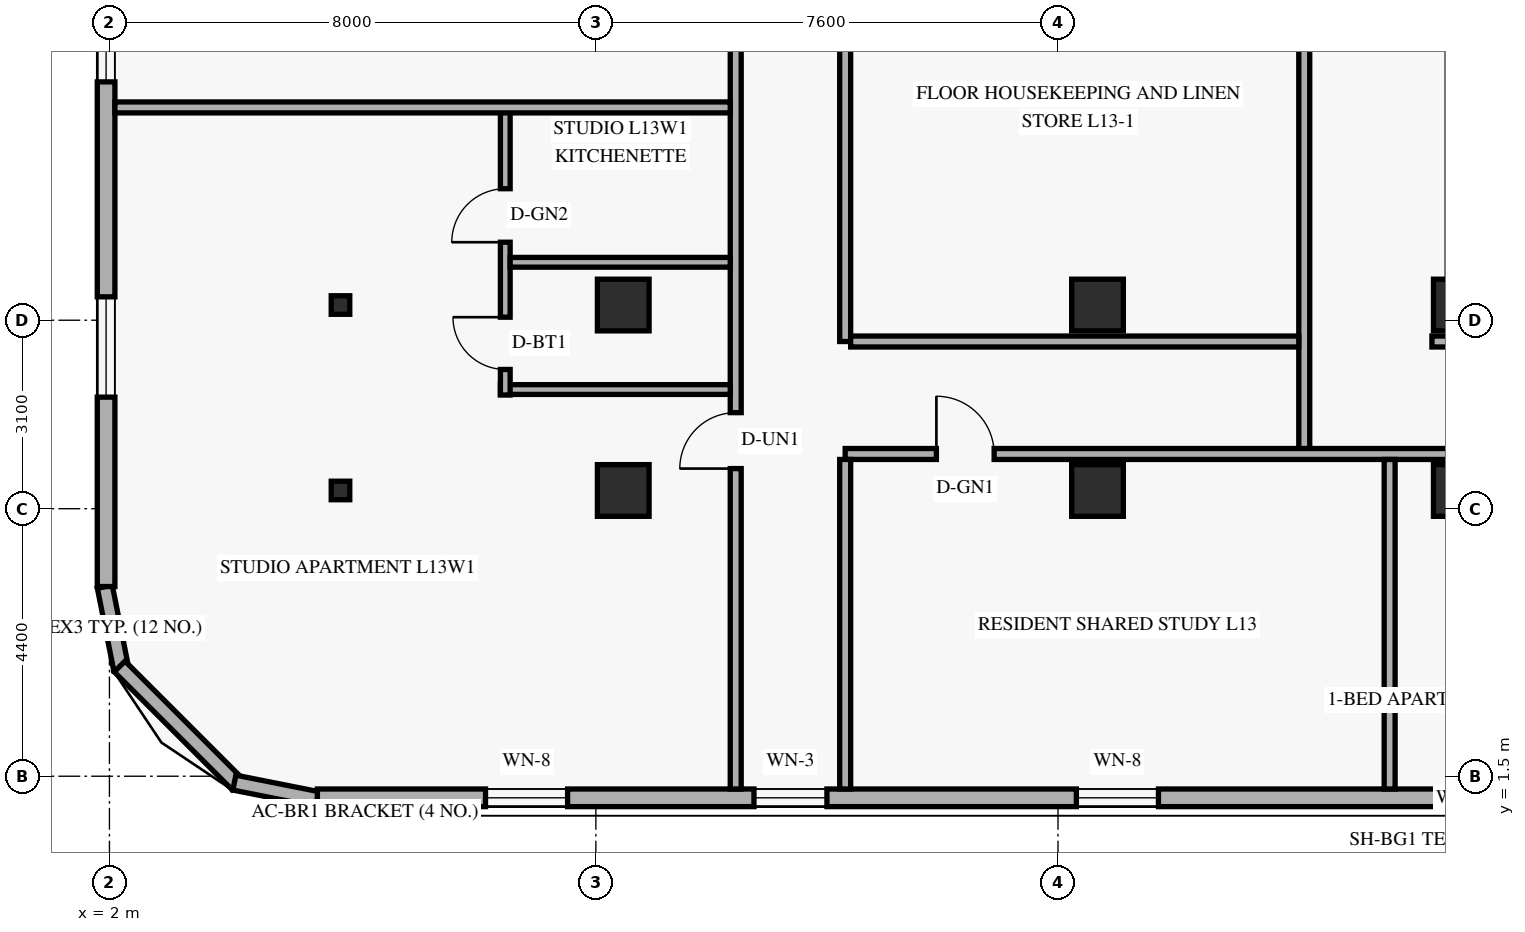
"""IFC4 building model, lengths in metres.
Left out: names, types, materials, properties, quantities, classifications, styles, units other than length and angle.
Written with IfcOpenShell. Run it as: python <this file> out.ifc"""

import sys

from ifc_helpers import new_model, si_unit, direction, frame, frame_2d, origin, origin_2d, place, context, subcontext, project, spatial, rectangle, hollow_rectangle, extrude, element, fill, save


model = new_model("IFC4")
c1 = context("Model", 3, precision=1e-05, world=origin(), true_north=direction((0.0, 1.0)))
c2 = subcontext(c1, "Body", "Model", "MODEL_VIEW")
j1 = project(units=[si_unit("LENGTHUNIT", "METRE"), si_unit("PLANEANGLEUNIT", "RADIAN")], contexts=[c1])
p1 = place(None, origin())
s1 = spatial("IfcSite", under=j1, at=p1, CompositionType="ELEMENT")
p2 = place(p1, origin())
s2 = spatial("IfcBuilding", under=s1, at=p2, CompositionType="ELEMENT")
p3 = place(p2, frame((0.0, 0.0, 52.8)))
s3 = spatial("IfcBuildingStorey", under=s2, at=p3, CompositionType="ELEMENT", Elevation=52.8)
for number, where, z_axis, x_axis in (
    (1, (5.8, 6.2, 0.0), (0.0, 0.0, 1.0), (1.0, 0.0, 0.0)),
    (2, (5.8, 9.25, 0.0), (0.0, 0.0, 1.0), (1.0, 0.0, 0.0)),
):
    element("IfcColumn", number, at=place(p3, frame(where, z_axis=z_axis, x_axis=x_axis)), inside=s3, PredefinedType="COLUMN", context=c2, shape_type="SweptSolid", body=[
        extrude(hollow_rectangle(XDim=0.305, YDim=0.305, WallThickness=0.013, at=origin_2d()), origin(), (0.0, 0.0, 1.0), 3.6),
    ])
for number, where, z_axis, x_axis in (
    (3, (10.45, 6.2, 0.0), (0.0, 0.0, 1.0), (1.0, 0.0, 0.0)),
    (4, (10.45, 9.25, 0.0), (0.0, 0.0, 1.0), (1.0, 0.0, 0.0)),
    (5, (18.25, 6.2, 0.0), (0.0, 0.0, 1.0), (1.0, 0.0, 0.0)),
    (6, (18.25, 9.25, 0.0), (0.0, 0.0, 1.0), (1.0, 0.0, 0.0)),
    (7, (24.2, 6.2, 0.0), (0.0, 0.0, 1.0), (1.0, 0.0, 0.0)),
    (8, (24.2, 9.25, 0.0), (0.0, 0.0, 1.0), (1.0, 0.0, 0.0)),
):
    element("IfcColumn", number, at=place(p3, frame(where, z_axis=z_axis, x_axis=x_axis)), inside=s3, PredefinedType="COLUMN", context=c2, shape_type="SweptSolid", body=[
        extrude(rectangle(XDim=0.85, YDim=0.85, at=origin_2d()), origin(), (0.0, 0.0, 1.0), 3.6),
    ])
p4 = place(p3, frame((1.924, 4.616, 0.0), z_axis=(0.0, 0.0, 1.0), x_axis=(0.19496651342, -0.980809899341, 0.0)))
e9 = element("IfcWall", 9, at=p4, inside=s3, PredefinedType="SOLIDWALL", context=c2, shape_type="SweptSolid", body=[
    extrude(rectangle(XDim=1.389, YDim=0.25, at=frame_2d((0.694, 0.0))), origin(), (0.0, 0.0, 1.0), 3.36),
])
p5 = place(p3, frame((2.168, 3.305, 0.0), z_axis=(0.0, 0.0, 1.0), x_axis=(0.707106781187, -0.707106781187, 0.0)))
e10 = element("IfcWall", 10, at=p5, inside=s3, PredefinedType="SOLIDWALL", context=c2, shape_type="SweptSolid", body=[
    extrude(rectangle(XDim=2.739, YDim=0.25, at=frame_2d((1.37, 0.0))), origin(), (0.0, 0.0, 1.0), 3.36),
])
p6 = place(p3, frame((4.054, 1.395, 0.0), z_axis=(0.0, 0.0, 1.0), x_axis=(0.980809899341, -0.19496651342, 0.0)))
e11 = element("IfcWall", 11, at=p6, inside=s3, PredefinedType="SOLIDWALL", context=c2, shape_type="SweptSolid", body=[
    extrude(rectangle(XDim=1.389, YDim=0.25, at=frame_2d((0.694, 0.0))), origin(), (0.0, 0.0, 1.0), 3.36),
])
p7 = place(p3, frame((5.42, 1.145, 0.0), z_axis=(0.0, 0.0, 1.0), x_axis=(1.0, 0.0, 0.0)))
e12 = element("IfcWall", 12, at=p7, inside=s3, PredefinedType="SOLIDWALL", context=c2, shape_type="SweptSolid", body=[
    extrude(rectangle(XDim=39.56, YDim=0.29, at=frame_2d((19.78, 0.0))), origin(), (0.0, 0.0, 1.0), 3.36),
])
p8 = place(p7, frame((2.765, 0.0, 0.85)))
e13 = element("IfcOpeningElement", 13, at=p8, cuts=e12, PredefinedType="OPENING", context=c2, shape_type="SweptSolid", body=[
    extrude(rectangle(XDim=1.35, YDim=1.55, at=frame_2d((0.675, 0.775))), frame((0.0, 0.155, 0.0), z_axis=(0.0, -1.0, 0.0), x_axis=(1.0, 0.0, 0.0)), (0.0, 0.0, 1.0), 0.31),
])
p9 = place(p7, frame((7.18, 0.0, 0.85)))
e14 = element("IfcOpeningElement", 14, at=p9, cuts=e12, PredefinedType="OPENING", context=c2, shape_type="SweptSolid", body=[
    extrude(rectangle(XDim=1.2, YDim=1.5, at=frame_2d((0.6, 0.75))), frame((0.0, 0.155, 0.0), z_axis=(0.0, -1.0, 0.0), x_axis=(1.0, 0.0, 0.0)), (0.0, 0.0, 1.0), 0.31),
])
p10 = place(p7, frame((12.482, 0.0, 0.85)))
e15 = element("IfcOpeningElement", 15, at=p10, cuts=e12, PredefinedType="OPENING", context=c2, shape_type="SweptSolid", body=[
    extrude(rectangle(XDim=1.35, YDim=1.55, at=frame_2d((0.675, 0.775))), frame((0.0, 0.155, 0.0), z_axis=(0.0, -1.0, 0.0), x_axis=(1.0, 0.0, 0.0)), (0.0, 0.0, 1.0), 0.31),
])
p11 = place(p7, frame((21.072, 0.0, 0.85)))
e16 = element("IfcOpeningElement", 16, at=p11, cuts=e12, PredefinedType="OPENING", context=c2, shape_type="SweptSolid", body=[
    extrude(rectangle(XDim=1.35, YDim=1.55, at=frame_2d((0.675, 0.775))), frame((0.0, 0.155, 0.0), z_axis=(0.0, -1.0, 0.0), x_axis=(1.0, 0.0, 0.0)), (0.0, 0.0, 1.0), 0.31),
])
p12 = place(p7, frame((27.255, 0.0, 0.85)))
e17 = element("IfcOpeningElement", 17, at=p12, cuts=e12, PredefinedType="OPENING", context=c2, shape_type="SweptSolid", body=[
    extrude(rectangle(XDim=1.35, YDim=1.55, at=frame_2d((0.675, 0.775))), frame((0.0, 0.155, 0.0), z_axis=(0.0, -1.0, 0.0), x_axis=(1.0, 0.0, 0.0)), (0.0, 0.0, 1.0), 0.31),
])
p13 = place(p7, frame((30.39, 0.0, 0.85)))
e18 = element("IfcOpeningElement", 18, at=p13, cuts=e12, PredefinedType="OPENING", context=c2, shape_type="SweptSolid", body=[
    extrude(rectangle(XDim=1.35, YDim=1.55, at=frame_2d((0.675, 0.775))), frame((0.0, 0.155, 0.0), z_axis=(0.0, -1.0, 0.0), x_axis=(1.0, 0.0, 0.0)), (0.0, 0.0, 1.0), 0.31),
])
p14 = place(p7, frame((35.17, 0.0, 0.85)))
e19 = element("IfcOpeningElement", 19, at=p14, cuts=e12, PredefinedType="OPENING", context=c2, shape_type="SweptSolid", body=[
    extrude(rectangle(XDim=1.35, YDim=1.55, at=frame_2d((0.675, 0.775))), frame((0.0, 0.155, 0.0), z_axis=(0.0, -1.0, 0.0), x_axis=(1.0, 0.0, 0.0)), (0.0, 0.0, 1.0), 0.31),
])
p15 = place(p3, frame((1.945, 43.38, 0.0), z_axis=(0.0, 0.0, 1.0), x_axis=(0.0, -1.0, 0.0)))
e20 = element("IfcWall", 20, at=p15, inside=s3, PredefinedType="SOLIDWALL", context=c2, shape_type="SweptSolid", body=[
    extrude(rectangle(XDim=38.76, YDim=0.29, at=frame_2d((19.38, 0.0))), origin(), (0.0, 0.0, 1.0), 3.36),
])
p16 = place(p15, frame((33.995, 0.0, 0.85)))
e21 = element("IfcOpeningElement", 21, at=p16, cuts=e20, PredefinedType="OPENING", context=c2, shape_type="SweptSolid", body=[
    extrude(rectangle(XDim=1.65, YDim=1.6, at=frame_2d((0.825, 0.8))), frame((0.0, 0.155, 0.0), z_axis=(0.0, -1.0, 0.0), x_axis=(1.0, 0.0, 0.0)), (0.0, 0.0, 1.0), 0.31),
])
p17 = place(p15, frame((28.81, 0.0, 0.85)))
e22 = element("IfcOpeningElement", 22, at=p17, cuts=e20, PredefinedType="OPENING", context=c2, shape_type="SweptSolid", body=[
    extrude(rectangle(XDim=1.65, YDim=1.6, at=frame_2d((0.825, 0.8))), frame((0.0, 0.155, 0.0), z_axis=(0.0, -1.0, 0.0), x_axis=(1.0, 0.0, 0.0)), (0.0, 0.0, 1.0), 0.31),
])
p18 = place(p15, frame((24.19, 0.0, 0.85)))
e23 = element("IfcOpeningElement", 23, at=p18, cuts=e20, PredefinedType="OPENING", context=c2, shape_type="SweptSolid", body=[
    extrude(rectangle(XDim=1.65, YDim=1.6, at=frame_2d((0.825, 0.8))), frame((0.0, 0.155, 0.0), z_axis=(0.0, -1.0, 0.0), x_axis=(1.0, 0.0, 0.0)), (0.0, 0.0, 1.0), 0.31),
])
p19 = place(p15, frame((18.995, 0.0, 0.85)))
e24 = element("IfcOpeningElement", 24, at=p19, cuts=e20, PredefinedType="OPENING", context=c2, shape_type="SweptSolid", body=[
    extrude(rectangle(XDim=1.65, YDim=1.6, at=frame_2d((0.825, 0.8))), frame((0.0, 0.155, 0.0), z_axis=(0.0, -1.0, 0.0), x_axis=(1.0, 0.0, 0.0)), (0.0, 0.0, 1.0), 0.31),
])
p20 = place(p15, frame((13.19, 0.0, 0.85)))
e25 = element("IfcOpeningElement", 25, at=p20, cuts=e20, PredefinedType="OPENING", context=c2, shape_type="SweptSolid", body=[
    extrude(rectangle(XDim=1.65, YDim=1.6, at=frame_2d((0.825, 0.8))), frame((0.0, 0.155, 0.0), z_axis=(0.0, -1.0, 0.0), x_axis=(1.0, 0.0, 0.0)), (0.0, 0.0, 1.0), 0.31),
])
p21 = place(p15, frame((7.21, 0.0, 0.85)))
e26 = element("IfcOpeningElement", 26, at=p21, cuts=e20, PredefinedType="OPENING", context=c2, shape_type="SweptSolid", body=[
    extrude(rectangle(XDim=1.65, YDim=1.6, at=frame_2d((0.825, 0.8))), frame((0.0, 0.155, 0.0), z_axis=(0.0, -1.0, 0.0), x_axis=(1.0, 0.0, 0.0)), (0.0, 0.0, 1.0), 0.31),
])
p22 = place(p15, frame((2.195, 0.0, 0.85)))
e27 = element("IfcOpeningElement", 27, at=p22, cuts=e20, PredefinedType="OPENING", context=c2, shape_type="SweptSolid", body=[
    extrude(rectangle(XDim=1.65, YDim=1.6, at=frame_2d((0.825, 0.8))), frame((0.0, 0.155, 0.0), z_axis=(0.0, -1.0, 0.0), x_axis=(1.0, 0.0, 0.0)), (0.0, 0.0, 1.0), 0.31),
])
p23 = place(p3, frame((21.65, 6.8, 0.0), z_axis=(0.0, 0.0, 1.0), x_axis=(0.0, 1.0, 0.0)))
e28 = element("IfcWall", 28, at=p23, inside=s3, PredefinedType="STANDARD", context=c2, shape_type="SweptSolid", body=[
    extrude(rectangle(XDim=34.4, YDim=0.18, at=frame_2d((17.2, 0.0))), origin(), (0.0, 0.0, 1.0), 2.649),
])
p24 = place(p3, frame((14.1, 6.8, 0.0), z_axis=(0.0, 0.0, 1.0), x_axis=(1.0, 0.0, 0.0)))
e29 = element("IfcWall", 29, at=p24, inside=s3, PredefinedType="STANDARD", context=c2, shape_type="SweptSolid", body=[
    extrude(rectangle(XDim=21.32, YDim=0.18, at=frame_2d((10.66, 0.0))), origin(), (0.0, 0.0, 1.0), 2.649),
])
p25 = place(p24, frame((1.5, 0.0, 0.0)))
e30 = element("IfcOpeningElement", 30, at=p25, cuts=e29, PredefinedType="OPENING", context=c2, shape_type="SweptSolid", body=[
    extrude(rectangle(XDim=0.95, YDim=2.15, at=frame_2d((0.475, 1.075))), frame((0.0, 0.1, 0.0), z_axis=(0.0, -1.0, 0.0), x_axis=(1.0, 0.0, 0.0)), (0.0, 0.0, 1.0), 0.2),
])
p26 = place(p24, frame((10.625, 0.0, 0.0)))
e31 = element("IfcOpeningElement", 31, at=p26, cuts=e29, PredefinedType="OPENING", context=c2, shape_type="SweptSolid", body=[
    extrude(rectangle(XDim=0.92, YDim=2.15, at=frame_2d((0.46, 1.075))), frame((0.0, 0.1, 0.0), z_axis=(0.0, -1.0, 0.0), x_axis=(1.0, 0.0, 0.0)), (0.0, 0.0, 1.0), 0.2),
])
p27 = place(p3, frame((23.75, 8.65, 0.0), z_axis=(0.0, 0.0, 1.0), x_axis=(1.0, 0.0, 0.0)))
e32 = element("IfcWall", 32, at=p27, inside=s3, PredefinedType="STANDARD", context=c2, shape_type="SweptSolid", body=[
    extrude(rectangle(XDim=11.67, YDim=0.18, at=frame_2d((5.835, 0.0))), origin(), (0.0, 0.0, 1.0), 2.649),
])
p28 = place(p3, frame((12.3, 1.29, 0.0), z_axis=(0.0, 0.0, 1.0), x_axis=(0.0, 1.0, 0.0)))
e33 = element("IfcWall", 33, at=p28, inside=s3, PredefinedType="STANDARD", context=c2, shape_type="SweptSolid", body=[
    extrude(rectangle(XDim=45.42, YDim=0.18, at=frame_2d((22.71, 0.0))), origin(), (0.0, 0.0, 1.0), 2.649),
])
p29 = place(p28, frame((5.27, 0.0, 0.0)))
e34 = element("IfcOpeningElement", 34, at=p29, cuts=e33, PredefinedType="OPENING", context=c2, shape_type="SweptSolid", body=[
    extrude(rectangle(XDim=0.92, YDim=2.15, at=frame_2d((0.46, 1.075))), frame((0.0, 0.1, 0.0), z_axis=(0.0, -1.0, 0.0), x_axis=(1.0, 0.0, 0.0)), (0.0, 0.0, 1.0), 0.2),
])
p30 = place(p28, frame((14.5, 0.0, 0.0)))
e35 = element("IfcOpeningElement", 35, at=p30, cuts=e33, PredefinedType="OPENING", context=c2, shape_type="SweptSolid", body=[
    extrude(rectangle(XDim=0.92, YDim=2.15, at=frame_2d((0.46, 1.075))), frame((0.0, 0.1, 0.0), z_axis=(0.0, -1.0, 0.0), x_axis=(1.0, 0.0, 0.0)), (0.0, 0.0, 1.0), 0.2),
])
p31 = place(p28, frame((26.082, 0.0, 0.0)))
e36 = element("IfcOpeningElement", 36, at=p31, cuts=e33, PredefinedType="OPENING", context=c2, shape_type="SweptSolid", body=[
    extrude(rectangle(XDim=0.92, YDim=2.15, at=frame_2d((0.46, 1.075))), frame((0.0, 0.1, 0.0), z_axis=(0.0, -1.0, 0.0), x_axis=(1.0, 0.0, 0.0)), (0.0, 0.0, 1.0), 0.2),
])
p32 = place(p28, frame((41.05, 0.0, 0.0)))
e37 = element("IfcOpeningElement", 37, at=p32, cuts=e33, PredefinedType="OPENING", context=c2, shape_type="SweptSolid", body=[
    extrude(rectangle(XDim=0.92, YDim=2.15, at=frame_2d((0.46, 1.075))), frame((0.0, 0.1, 0.0), z_axis=(0.0, -1.0, 0.0), x_axis=(1.0, 0.0, 0.0)), (0.0, 0.0, 1.0), 0.2),
])
p33 = place(p3, frame((14.1, 8.65, 0.0), z_axis=(0.0, 0.0, 1.0), x_axis=(0.0, 1.0, 0.0)))
e38 = element("IfcWall", 38, at=p33, inside=s3, PredefinedType="STANDARD", context=c2, shape_type="SweptSolid", body=[
    extrude(rectangle(XDim=30.7, YDim=0.18, at=frame_2d((15.35, 0.0))), origin(), (0.0, 0.0, 1.0), 2.649),
])
p34 = place(p33, frame((7.025, 0.0, 0.0)))
e39 = element("IfcOpeningElement", 39, at=p34, cuts=e38, PredefinedType="OPENING", context=c2, shape_type="SweptSolid", body=[
    extrude(rectangle(XDim=0.9, YDim=2.1, at=frame_2d((0.45, 1.05))), frame((0.0, 0.1, 0.0), z_axis=(0.0, -1.0, 0.0), x_axis=(1.0, 0.0, 0.0)), (0.0, 0.0, 1.0), 0.2),
])
p35 = place(p33, frame((22.375, 0.0, 0.0)))
e40 = element("IfcOpeningElement", 40, at=p35, cuts=e38, PredefinedType="OPENING", context=c2, shape_type="SweptSolid", body=[
    extrude(rectangle(XDim=0.9, YDim=2.1, at=frame_2d((0.45, 1.05))), frame((0.0, 0.1, 0.0), z_axis=(0.0, -1.0, 0.0), x_axis=(1.0, 0.0, 0.0)), (0.0, 0.0, 1.0), 0.2),
])
p36 = place(p3, frame((14.19, 8.65, 0.0), z_axis=(0.0, 0.0, 1.0), x_axis=(1.0, 0.0, 0.0)))
e41 = element("IfcWall", 41, at=p36, inside=s3, PredefinedType="STANDARD", context=c2, shape_type="SweptSolid", body=[
    extrude(rectangle(XDim=7.37, YDim=0.18, at=frame_2d((3.685, 0.0))), origin(), (0.0, 0.0, 1.0), 2.649),
])
p37 = place(p3, frame((14.1, 1.29, 0.0), z_axis=(0.0, 0.0, 1.0), x_axis=(0.0, 1.0, 0.0)))
e42 = element("IfcWall", 42, at=p37, inside=s3, PredefinedType="PARTITIONING", context=c2, shape_type="SweptSolid", body=[
    extrude(rectangle(XDim=5.42, YDim=0.18, at=frame_2d((2.71, 0.0))), origin(), (0.0, 0.0, 1.0), 2.809),
])
p38 = place(p3, frame((8.43, 7.86, 0.0), z_axis=(0.0, 0.0, 1.0), x_axis=(1.0, 0.0, 0.0)))
e43 = element("IfcWall", 43, at=p38, inside=s3, PredefinedType="PLUMBINGWALL", context=c2, shape_type="SweptSolid", body=[
    extrude(rectangle(XDim=3.78, YDim=0.16, at=frame_2d((1.89, 0.0))), origin(), (0.0, 0.0, 1.0), 2.649),
])
p39 = place(p3, frame((8.51, 7.77, 0.0), z_axis=(0.0, 0.0, 1.0), x_axis=(0.0, 1.0, 0.0)))
e44 = element("IfcWall", 44, at=p39, inside=s3, PredefinedType="PLUMBINGWALL", context=c2, shape_type="SweptSolid", body=[
    extrude(rectangle(XDim=4.73, YDim=0.16, at=frame_2d((2.365, 0.0))), origin(), (0.0, 0.0, 1.0), 2.649),
])
p40 = place(p39, frame((0.42, 0.0, 0.0)))
e45 = element("IfcOpeningElement", 45, at=p40, cuts=e44, PredefinedType="OPENING", context=c2, shape_type="SweptSolid", body=[
    extrude(rectangle(XDim=0.86, YDim=2.12, at=frame_2d((0.43, 1.06))), frame((0.0, 0.09, 0.0), z_axis=(0.0, -1.0, 0.0), x_axis=(1.0, 0.0, 0.0)), (0.0, 0.0, 1.0), 0.18),
])
p41 = place(p39, frame((2.513, 0.0, 0.0)))
e46 = element("IfcOpeningElement", 46, at=p41, cuts=e44, PredefinedType="OPENING", context=c2, shape_type="SweptSolid", body=[
    extrude(rectangle(XDim=0.88, YDim=2.12, at=frame_2d((0.44, 1.06))), frame((0.0, 0.09, 0.0), z_axis=(0.0, -1.0, 0.0), x_axis=(1.0, 0.0, 0.0)), (0.0, 0.0, 1.0), 0.18),
])
p42 = place(p3, frame((8.59, 9.953, 0.0), z_axis=(0.0, 0.0, 1.0), x_axis=(1.0, 0.0, 0.0)))
e47 = element("IfcWall", 47, at=p42, inside=s3, PredefinedType="PLUMBINGWALL", context=c2, shape_type="SweptSolid", body=[
    extrude(rectangle(XDim=3.62, YDim=0.16, at=frame_2d((1.81, 0.0))), origin(), (0.0, 0.0, 1.0), 2.649),
])
p43 = place(p3, frame((2.09, 12.5, 0.0), z_axis=(0.0, 0.0, 1.0), x_axis=(1.0, 0.0, 0.0)))
e48 = element("IfcWall", 48, at=p43, inside=s3, PredefinedType="PARTITIONING", context=c2, shape_type="SweptSolid", body=[
    extrude(rectangle(XDim=10.12, YDim=0.18, at=frame_2d((5.06, 0.0))), origin(), (0.0, 0.0, 1.0), 2.649),
])
p44 = place(p3, frame((23.054, 1.29, 0.0), z_axis=(0.0, 0.0, 1.0), x_axis=(0.0, 1.0, 0.0)))
e49 = element("IfcWall", 49, at=p44, inside=s3, PredefinedType="PARTITIONING", context=c2, shape_type="SweptSolid", body=[
    extrude(rectangle(XDim=5.42, YDim=0.18, at=frame_2d((2.71, 0.0))), origin(), (0.0, 0.0, 1.0), 2.809),
])
p45 = place(p8, origin())
e50 = element("IfcWindow", 50, at=p45, inside=s3, PartitioningType="SINGLE_PANEL", PredefinedType="WINDOW", context=c2, shape_type="SweptSolid", body=[
    extrude(rectangle(XDim=1.35, YDim=1.55, at=frame_2d((0.675, 0.775))), frame((0.0, 0.03, 0.0), z_axis=(0.0, -1.0, 0.0), x_axis=(1.0, 0.0, 0.0)), (0.0, 0.0, 1.0), 0.06),
])
fill(e13, e50)
p46 = place(p9, origin())
e51 = element("IfcWindow", 51, at=p46, inside=s3, PartitioningType="SINGLE_PANEL", PredefinedType="WINDOW", context=c2, shape_type="SweptSolid", body=[
    extrude(rectangle(XDim=1.2, YDim=1.5, at=frame_2d((0.6, 0.75))), frame((0.0, 0.03, 0.0), z_axis=(0.0, -1.0, 0.0), x_axis=(1.0, 0.0, 0.0)), (0.0, 0.0, 1.0), 0.06),
])
fill(e14, e51)
p47 = place(p10, origin())
e52 = element("IfcWindow", 52, at=p47, inside=s3, PartitioningType="SINGLE_PANEL", PredefinedType="WINDOW", context=c2, shape_type="SweptSolid", body=[
    extrude(rectangle(XDim=1.35, YDim=1.55, at=frame_2d((0.675, 0.775))), frame((0.0, 0.03, 0.0), z_axis=(0.0, -1.0, 0.0), x_axis=(1.0, 0.0, 0.0)), (0.0, 0.0, 1.0), 0.06),
])
fill(e15, e52)
p48 = place(p16, origin())
e53 = element("IfcWindow", 53, at=p48, inside=s3, PartitioningType="SINGLE_PANEL", PredefinedType="WINDOW", context=c2, shape_type="SweptSolid", body=[
    extrude(rectangle(XDim=1.65, YDim=1.6, at=frame_2d((0.825, 0.8))), frame((0.0, 0.03, 0.0), z_axis=(0.0, -1.0, 0.0), x_axis=(1.0, 0.0, 0.0)), (0.0, 0.0, 1.0), 0.06),
])
fill(e21, e53)
p49 = place(p17, origin())
e54 = element("IfcWindow", 54, at=p49, inside=s3, PartitioningType="SINGLE_PANEL", PredefinedType="WINDOW", context=c2, shape_type="SweptSolid", body=[
    extrude(rectangle(XDim=1.65, YDim=1.6, at=frame_2d((0.825, 0.8))), frame((0.0, 0.03, 0.0), z_axis=(0.0, -1.0, 0.0), x_axis=(1.0, 0.0, 0.0)), (0.0, 0.0, 1.0), 0.06),
])
fill(e22, e54)
p50 = place(p29, origin())
e55 = element("IfcDoor", 55, at=p50, inside=s3, OperationType="SINGLE_SWING_LEFT", PredefinedType="DOOR", context=c2, shape_type="SweptSolid", body=[
    extrude(rectangle(XDim=0.92, YDim=2.15, at=frame_2d((0.46, 1.075))), frame((0.0, 0.025, 0.0), z_axis=(0.0, -1.0, 0.0), x_axis=(1.0, 0.0, 0.0)), (0.0, 0.0, 1.0), 0.05),
])
fill(e34, e55)
p51 = place(p40, origin())
e56 = element("IfcDoor", 56, at=p51, inside=s3, OperationType="SINGLE_SWING_RIGHT", PredefinedType="DOOR", context=c2, shape_type="SweptSolid", body=[
    extrude(rectangle(XDim=0.86, YDim=2.12, at=frame_2d((0.43, 1.06))), frame((0.0, 0.025, 0.0), z_axis=(0.0, -1.0, 0.0), x_axis=(1.0, 0.0, 0.0)), (0.0, 0.0, 1.0), 0.05),
])
fill(e45, e56)
p52 = place(p41, origin())
e57 = element("IfcDoor", 57, at=p52, inside=s3, OperationType="SINGLE_SWING_LEFT", PredefinedType="DOOR", context=c2, shape_type="SweptSolid", body=[
    extrude(rectangle(XDim=0.88, YDim=2.12, at=frame_2d((0.44, 1.06))), frame((0.0, 0.025, 0.0), z_axis=(0.0, -1.0, 0.0), x_axis=(1.0, 0.0, 0.0)), (0.0, 0.0, 1.0), 0.05),
])
fill(e46, e57)
p53 = place(p25, origin())
e58 = element("IfcDoor", 58, at=p53, inside=s3, OperationType="SINGLE_SWING_LEFT", PredefinedType="DOOR", context=c2, shape_type="SweptSolid", body=[
    extrude(rectangle(XDim=0.95, YDim=2.15, at=frame_2d((0.475, 1.075))), frame((0.0, 0.025, 0.0), z_axis=(0.0, -1.0, 0.0), x_axis=(1.0, 0.0, 0.0)), (0.0, 0.0, 1.0), 0.05),
])
fill(e30, e58)
save(model, sys.argv[1])
